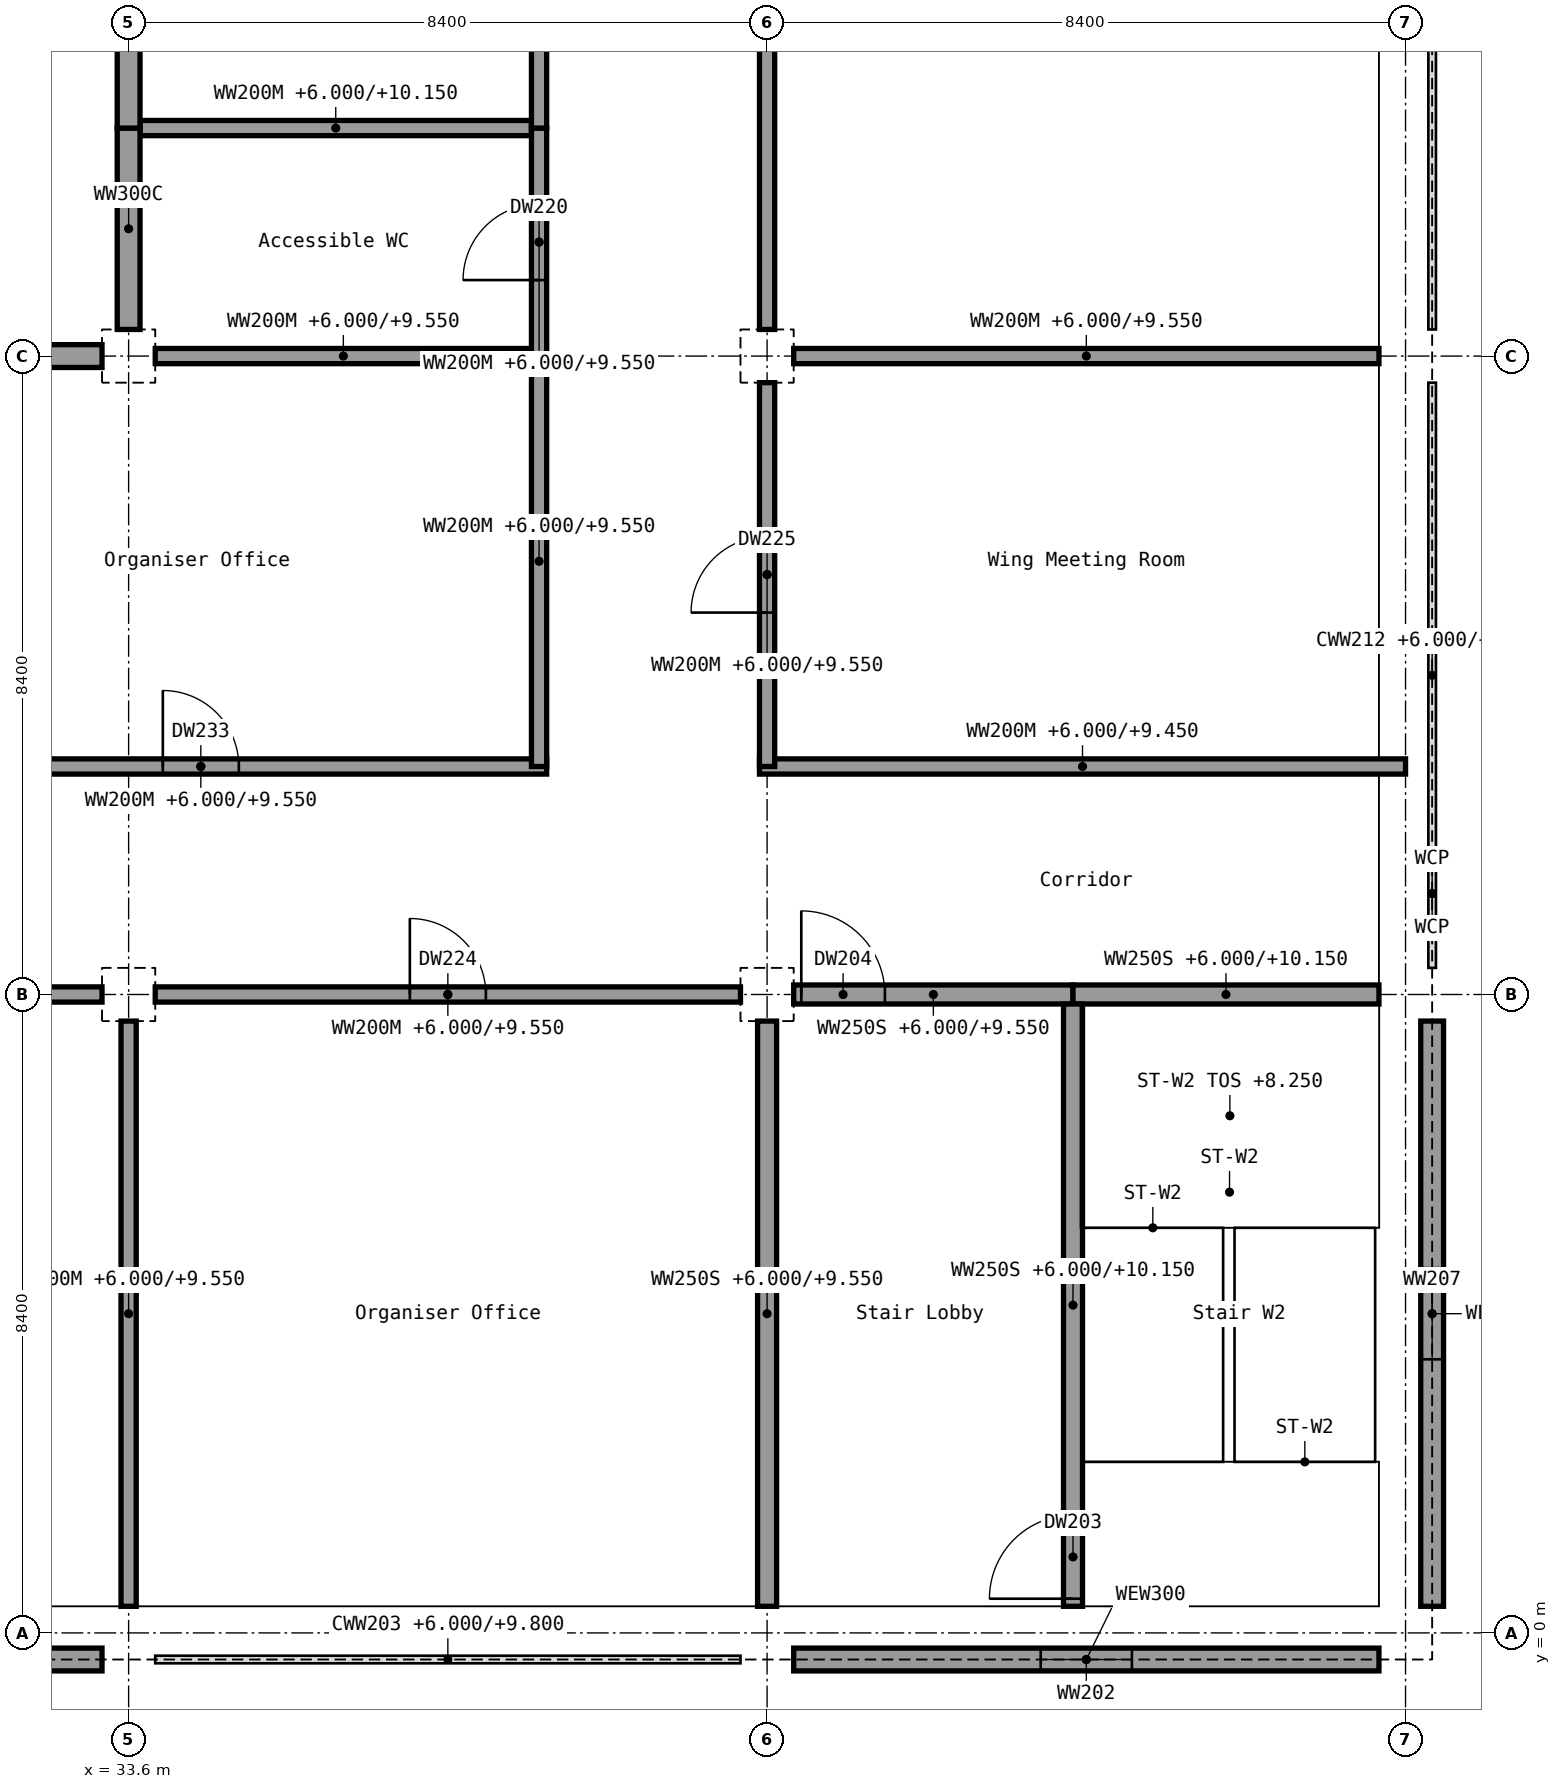
"""IFC4 building model, lengths in metres.
Left out: names, types, materials, properties, quantities, classifications, styles, units other than length and angle.
Written with IfcOpenShell. Run it as: python <this file> out.ifc"""

import sys

from ifc_helpers import new_model, si_unit, direction, frame, frame_2d, origin, origin_2d, place, context, subcontext, project, spatial, rectangle, extrude, element, fill, save


model = new_model("IFC4")
c1 = context("Model", 3, precision=1e-05, world=origin(), true_north=direction((0.0, 1.0)))
c2 = subcontext(c1, "Body", "Model", "MODEL_VIEW")
j1 = project(units=[si_unit("LENGTHUNIT", "METRE"), si_unit("PLANEANGLEUNIT", "RADIAN")], contexts=[c1])
p1 = place(None, origin())
s1 = spatial("IfcSite", under=j1, at=p1, CompositionType="ELEMENT")
p2 = place(p1, origin())
s2 = spatial("IfcBuilding", under=s1, at=p2, CompositionType="ELEMENT")
p3 = place(p2, frame((0.0, 0.0, 6.0)))
s3 = spatial("IfcBuildingStorey", under=s2, at=p3, CompositionType="ELEMENT", Elevation=6.0)
for number, where, z_axis, x_axis in (
    (1, (33.6, 0.0, 0.0), (0.0, 0.0, 1.0), (1.0, 0.0, 0.0)),
    (2, (33.6, 8.4, 0.0), (0.0, 0.0, 1.0), (1.0, 0.0, 0.0)),
    (3, (33.6, 16.8, 0.0), (0.0, 0.0, 1.0), (1.0, 0.0, 0.0)),
    (4, (42.0, 0.0, 0.0), (0.0, 0.0, 1.0), (1.0, 0.0, 0.0)),
    (5, (42.0, 8.4, 0.0), (0.0, 0.0, 1.0), (1.0, 0.0, 0.0)),
    (6, (42.0, 16.8, 0.0), (0.0, 0.0, 1.0), (1.0, 0.0, 0.0)),
    (7, (50.4, 0.0, 0.0), (0.0, 0.0, 1.0), (1.0, 0.0, 0.0)),
    (8, (50.4, 8.4, 0.0), (0.0, 0.0, 1.0), (1.0, 0.0, 0.0)),
    (9, (50.4, 16.8, 0.0), (0.0, 0.0, 1.0), (1.0, 0.0, 0.0)),
):
    element("IfcColumn", number, at=place(p3, frame(where, z_axis=z_axis, x_axis=x_axis)), inside=s3, PredefinedType="COLUMN", context=c2, shape_type="SweptSolid", body=[
        extrude(rectangle(XDim=0.7, YDim=0.7, at=origin_2d()), origin(), (0.0, 0.0, 1.0), 4.5),
    ])
p4 = place(p3, frame((25.55, -0.35, 0.0), z_axis=(0.0, 0.0, 1.0), x_axis=(1.0, 0.0, 0.0)))
e10 = element("IfcWall", 10, at=p4, inside=s3, PredefinedType="SOLIDWALL", context=c2, shape_type="SweptSolid", body=[
    extrude(rectangle(XDim=7.7, YDim=0.3, at=frame_2d((3.85, 0.0))), origin(), (0.0, 0.0, 1.0), 3.8),
])
p5 = place(p4, frame((3.25, 0.0, 0.0)))
e11 = element("IfcOpeningElement", 11, at=p5, cuts=e10, PredefinedType="OPENING", context=c2, shape_type="SweptSolid", body=[
    extrude(rectangle(XDim=1.2, YDim=2.1, at=frame_2d((0.6, 1.05))), frame((0.0, 0.15, 0.0), z_axis=(0.0, -1.0, 0.0), x_axis=(1.0, 0.0, 0.0)), (0.0, 0.0, 1.0), 0.3),
])
p6 = place(p3, frame((42.35, -0.35, 0.0), z_axis=(0.0, 0.0, 1.0), x_axis=(1.0, 0.0, 0.0)))
e12 = element("IfcWall", 12, at=p6, inside=s3, PredefinedType="SOLIDWALL", context=c2, shape_type="SweptSolid", body=[
    extrude(rectangle(XDim=7.7, YDim=0.3, at=frame_2d((3.85, 0.0))), origin(), (0.0, 0.0, 1.0), 3.8),
])
p7 = place(p6, frame((3.25, 0.0, 1.0)))
e13 = element("IfcOpeningElement", 13, at=p7, cuts=e12, PredefinedType="OPENING", context=c2, shape_type="SweptSolid", body=[
    extrude(rectangle(XDim=1.2, YDim=1.5, at=frame_2d((0.6, 0.75))), frame((0.0, 0.15, 0.0), z_axis=(0.0, -1.0, 0.0), x_axis=(1.0, 0.0, 0.0)), (0.0, 0.0, 1.0), 0.3),
])
p8 = place(p3, frame((50.75, 0.35, 0.0), z_axis=(0.0, 0.0, 1.0), x_axis=(0.0, 1.0, 0.0)))
e14 = element("IfcWall", 14, at=p8, inside=s3, PredefinedType="SOLIDWALL", context=c2, shape_type="SweptSolid", body=[
    extrude(rectangle(XDim=7.7, YDim=0.3, at=frame_2d((3.85, 0.0))), origin(), (0.0, 0.0, 1.0), 3.8),
])
p9 = place(p8, frame((3.25, 0.0, 1.0)))
e15 = element("IfcOpeningElement", 15, at=p9, cuts=e14, PredefinedType="OPENING", context=c2, shape_type="SweptSolid", body=[
    extrude(rectangle(XDim=1.2, YDim=1.5, at=frame_2d((0.6, 0.75))), frame((0.0, 0.15, 0.0), z_axis=(0.0, -1.0, 0.0), x_axis=(1.0, 0.0, 0.0)), (0.0, 0.0, 1.0), 0.3),
])
p10 = place(p3, frame((25.55, 8.4, 0.0), z_axis=(0.0, 0.0, 1.0), x_axis=(1.0, 0.0, 0.0)))
e16 = element("IfcWall", 16, at=p10, inside=s3, PredefinedType="PARTITIONING", context=c2, shape_type="SweptSolid", body=[
    extrude(rectangle(XDim=7.7, YDim=0.2, at=frame_2d((3.85, 0.0))), origin(), (0.0, 0.0, 1.0), 3.55),
])
p11 = place(p10, frame((3.35, 0.0, 0.0)))
e17 = element("IfcOpeningElement", 17, at=p11, cuts=e16, PredefinedType="OPENING", context=c2, shape_type="SweptSolid", body=[
    extrude(rectangle(XDim=1.0, YDim=2.1, at=frame_2d((0.5, 1.05))), frame((0.0, 0.1, 0.0), z_axis=(0.0, -1.0, 0.0), x_axis=(1.0, 0.0, 0.0)), (0.0, 0.0, 1.0), 0.2),
])
p12 = place(p3, frame((33.95, 8.4, 0.0), z_axis=(0.0, 0.0, 1.0), x_axis=(1.0, 0.0, 0.0)))
e18 = element("IfcWall", 18, at=p12, inside=s3, PredefinedType="PARTITIONING", context=c2, shape_type="SweptSolid", body=[
    extrude(rectangle(XDim=7.7, YDim=0.2, at=frame_2d((3.85, 0.0))), origin(), (0.0, 0.0, 1.0), 3.55),
])
p13 = place(p12, frame((3.35, 0.0, 0.0)))
e19 = element("IfcOpeningElement", 19, at=p13, cuts=e18, PredefinedType="OPENING", context=c2, shape_type="SweptSolid", body=[
    extrude(rectangle(XDim=1.0, YDim=2.1, at=frame_2d((0.5, 1.05))), frame((0.0, 0.1, 0.0), z_axis=(0.0, -1.0, 0.0), x_axis=(1.0, 0.0, 0.0)), (0.0, 0.0, 1.0), 0.2),
])
p14 = place(p3, frame((42.35, 8.4, 0.0), z_axis=(0.0, 0.0, 1.0), x_axis=(1.0, 0.0, 0.0)))
e20 = element("IfcWall", 20, at=p14, inside=s3, PredefinedType="SHEAR", context=c2, shape_type="SweptSolid", body=[
    extrude(rectangle(XDim=3.675, YDim=0.25, at=frame_2d((1.837, 0.0))), origin(), (0.0, 0.0, 1.0), 3.55),
])
p15 = place(p14, frame((0.1, 0.0, 0.0)))
e21 = element("IfcOpeningElement", 21, at=p15, cuts=e20, PredefinedType="OPENING", context=c2, shape_type="SweptSolid", body=[
    extrude(rectangle(XDim=1.1, YDim=2.1, at=frame_2d((0.55, 1.05))), frame((0.0, 0.125, 0.0), z_axis=(0.0, -1.0, 0.0), x_axis=(1.0, 0.0, 0.0)), (0.0, 0.0, 1.0), 0.25),
])
p16 = place(p3, frame((46.025, 8.4, 0.0), z_axis=(0.0, 0.0, 1.0), x_axis=(1.0, 0.0, 0.0)))
e22 = element("IfcWall", 22, at=p16, inside=s3, PredefinedType="SHEAR", context=c2, shape_type="SweptSolid", body=[
    extrude(rectangle(XDim=4.025, YDim=0.25, at=frame_2d((2.013, 0.0))), origin(), (0.0, 0.0, 1.0), 4.15),
])
p17 = place(p3, frame((30.0, 11.4, 0.0), z_axis=(0.0, 0.0, 1.0), x_axis=(1.0, 0.0, 0.0)))
e23 = element("IfcWall", 23, at=p17, inside=s3, PredefinedType="PARTITIONING", context=c2, shape_type="SweptSolid", body=[
    extrude(rectangle(XDim=9.1, YDim=0.2, at=frame_2d((4.55, 0.0))), origin(), (0.0, 0.0, 1.0), 3.55),
])
p18 = place(p17, frame((4.05, 0.0, 0.0)))
e24 = element("IfcOpeningElement", 24, at=p18, cuts=e23, PredefinedType="OPENING", context=c2, shape_type="SweptSolid", body=[
    extrude(rectangle(XDim=1.0, YDim=2.1, at=frame_2d((0.5, 1.05))), frame((0.0, 0.1, 0.0), z_axis=(0.0, -1.0, 0.0), x_axis=(1.0, 0.0, 0.0)), (0.0, 0.0, 1.0), 0.2),
])
p19 = place(p3, frame((41.9, 11.4, 0.0), z_axis=(0.0, 0.0, 1.0), x_axis=(1.0, 0.0, 0.0)))
e25 = element("IfcWall", 25, at=p19, inside=s3, PredefinedType="PARTITIONING", context=c2, shape_type="SweptSolid", body=[
    extrude(rectangle(XDim=8.5, YDim=0.2, at=frame_2d((4.25, 0.0))), origin(), (0.0, 0.0, 1.0), 3.45),
])
p20 = place(p3, frame((30.0, 16.8, 0.0), z_axis=(0.0, 0.0, 1.0), x_axis=(1.0, 0.0, 0.0)))
e26 = element("IfcWall", 26, at=p20, inside=s3, PredefinedType="SHEAR", context=c2, shape_type="SweptSolid", body=[
    extrude(rectangle(XDim=3.25, YDim=0.3, at=frame_2d((1.625, 0.0))), origin(), (0.0, 0.0, 1.0), 4.15),
])
p21 = place(p3, frame((33.95, 16.8, 0.0), z_axis=(0.0, 0.0, 1.0), x_axis=(1.0, 0.0, 0.0)))
e27 = element("IfcWall", 27, at=p21, inside=s3, PredefinedType="PARTITIONING", context=c2, shape_type="SweptSolid", body=[
    extrude(rectangle(XDim=4.95, YDim=0.2, at=frame_2d((2.475, 0.0))), origin(), (0.0, 0.0, 1.0), 3.55),
])
p22 = place(p3, frame((42.35, 16.8, 0.0), z_axis=(0.0, 0.0, 1.0), x_axis=(1.0, 0.0, 0.0)))
e28 = element("IfcWall", 28, at=p22, inside=s3, PredefinedType="PARTITIONING", context=c2, shape_type="SweptSolid", body=[
    extrude(rectangle(XDim=7.7, YDim=0.2, at=frame_2d((3.85, 0.0))), origin(), (0.0, 0.0, 1.0), 3.55),
])
p23 = place(p3, frame((33.75, 19.8, 0.0), z_axis=(0.0, 0.0, 1.0), x_axis=(1.0, 0.0, 0.0)))
e29 = element("IfcWall", 29, at=p23, inside=s3, PredefinedType="PARTITIONING", context=c2, shape_type="SweptSolid", body=[
    extrude(rectangle(XDim=5.15, YDim=0.2, at=frame_2d((2.575, 0.0))), origin(), (0.0, 0.0, 1.0), 4.15),
])
p24 = place(p3, frame((33.6, 0.35, 0.0), z_axis=(0.0, 0.0, 1.0), x_axis=(0.0, 1.0, 0.0)))
e30 = element("IfcWall", 30, at=p24, inside=s3, PredefinedType="PARTITIONING", context=c2, shape_type="SweptSolid", body=[
    extrude(rectangle(XDim=7.7, YDim=0.2, at=frame_2d((3.85, 0.0))), origin(), (0.0, 0.0, 1.0), 3.55),
])
p25 = place(p3, frame((33.6, 17.15, 0.0), z_axis=(0.0, 0.0, 1.0), x_axis=(0.0, 1.0, 0.0)))
e31 = element("IfcWall", 31, at=p25, inside=s3, PredefinedType="SHEAR", context=c2, shape_type="SweptSolid", body=[
    extrude(rectangle(XDim=2.65, YDim=0.3, at=frame_2d((1.325, 0.0))), origin(), (0.0, 0.0, 1.0), 4.15),
])
p26 = place(p3, frame((33.6, 19.8, 0.0), z_axis=(0.0, 0.0, 1.0), x_axis=(0.0, 1.0, 0.0)))
e32 = element("IfcWall", 32, at=p26, inside=s3, PredefinedType="SHEAR", context=c2, shape_type="SweptSolid", body=[
    extrude(rectangle(XDim=4.8, YDim=0.3, at=frame_2d((2.4, 0.0))), origin(), (0.0, 0.0, 1.0), 4.15),
])
p27 = place(p3, frame((39.0, 11.4, 0.0), z_axis=(0.0, 0.0, 1.0), x_axis=(0.0, 1.0, 0.0)))
e33 = element("IfcWall", 33, at=p27, inside=s3, PredefinedType="PARTITIONING", context=c2, shape_type="SweptSolid", body=[
    extrude(rectangle(XDim=5.4, YDim=0.2, at=frame_2d((2.7, 0.0))), origin(), (0.0, 0.0, 1.0), 3.55),
])
p28 = place(p3, frame((39.0, 16.8, 0.0), z_axis=(0.0, 0.0, 1.0), x_axis=(0.0, 1.0, 0.0)))
e34 = element("IfcWall", 34, at=p28, inside=s3, PredefinedType="PARTITIONING", context=c2, shape_type="SweptSolid", body=[
    extrude(rectangle(XDim=3.0, YDim=0.2, at=frame_2d((1.5, 0.0))), origin(), (0.0, 0.0, 1.0), 3.55),
])
p29 = place(p28, frame((1.0, 0.0, 0.0)))
e35 = element("IfcOpeningElement", 35, at=p29, cuts=e34, PredefinedType="OPENING", context=c2, shape_type="SweptSolid", body=[
    extrude(rectangle(XDim=1.0, YDim=2.1, at=frame_2d((0.5, 1.05))), frame((0.0, 0.1, 0.0), z_axis=(0.0, -1.0, 0.0), x_axis=(1.0, 0.0, 0.0)), (0.0, 0.0, 1.0), 0.2),
])
p30 = place(p3, frame((39.0, 19.8, 0.0), z_axis=(0.0, 0.0, 1.0), x_axis=(0.0, 1.0, 0.0)))
e36 = element("IfcWall", 36, at=p30, inside=s3, PredefinedType="PARTITIONING", context=c2, shape_type="SweptSolid", body=[
    extrude(rectangle(XDim=13.8, YDim=0.2, at=frame_2d((6.9, 0.0))), origin(), (0.0, 0.0, 1.0), 3.55),
])
p31 = place(p30, frame((6.4, 0.0, 0.0)))
e37 = element("IfcOpeningElement", 37, at=p31, cuts=e36, PredefinedType="OPENING", context=c2, shape_type="SweptSolid", body=[
    extrude(rectangle(XDim=1.0, YDim=2.1, at=frame_2d((0.5, 1.05))), frame((0.0, 0.1, 0.0), z_axis=(0.0, -1.0, 0.0), x_axis=(1.0, 0.0, 0.0)), (0.0, 0.0, 1.0), 0.2),
])
p32 = place(p3, frame((42.0, 0.35, 0.0), z_axis=(0.0, 0.0, 1.0), x_axis=(0.0, 1.0, 0.0)))
e38 = element("IfcWall", 38, at=p32, inside=s3, PredefinedType="SHEAR", context=c2, shape_type="SweptSolid", body=[
    extrude(rectangle(XDim=7.7, YDim=0.25, at=frame_2d((3.85, 0.0))), origin(), (0.0, 0.0, 1.0), 3.55),
])
p33 = place(p3, frame((42.0, 11.4, 0.0), z_axis=(0.0, 0.0, 1.0), x_axis=(0.0, 1.0, 0.0)))
e39 = element("IfcWall", 39, at=p33, inside=s3, PredefinedType="PARTITIONING", context=c2, shape_type="SweptSolid", body=[
    extrude(rectangle(XDim=5.05, YDim=0.2, at=frame_2d((2.525, 0.0))), origin(), (0.0, 0.0, 1.0), 3.55),
])
p34 = place(p33, frame((2.025, 0.0, 0.0)))
e40 = element("IfcOpeningElement", 40, at=p34, cuts=e39, PredefinedType="OPENING", context=c2, shape_type="SweptSolid", body=[
    extrude(rectangle(XDim=1.0, YDim=2.1, at=frame_2d((0.5, 1.05))), frame((0.0, 0.1, 0.0), z_axis=(0.0, -1.0, 0.0), x_axis=(1.0, 0.0, 0.0)), (0.0, 0.0, 1.0), 0.2),
])
p35 = place(p3, frame((42.0, 17.15, 0.0), z_axis=(0.0, 0.0, 1.0), x_axis=(0.0, 1.0, 0.0)))
e41 = element("IfcWall", 41, at=p35, inside=s3, PredefinedType="PARTITIONING", context=c2, shape_type="SweptSolid", body=[
    extrude(rectangle(XDim=7.7, YDim=0.2, at=frame_2d((3.85, 0.0))), origin(), (0.0, 0.0, 1.0), 3.55),
])
p36 = place(p3, frame((46.025, 0.35, 0.0), z_axis=(0.0, 0.0, 1.0), x_axis=(0.0, 1.0, 0.0)))
e42 = element("IfcWall", 42, at=p36, inside=s3, PredefinedType="SHEAR", context=c2, shape_type="SweptSolid", body=[
    extrude(rectangle(XDim=7.925, YDim=0.25, at=frame_2d((3.962, 0.0))), origin(), (0.0, 0.0, 1.0), 4.15),
])
p37 = place(p36, frame((0.1, 0.0, 0.0)))
e43 = element("IfcOpeningElement", 43, at=p37, cuts=e42, PredefinedType="OPENING", context=c2, shape_type="SweptSolid", body=[
    extrude(rectangle(XDim=1.1, YDim=2.1, at=frame_2d((0.55, 1.05))), frame((0.0, 0.125, 0.0), z_axis=(0.0, -1.0, 0.0), x_axis=(1.0, 0.0, 0.0)), (0.0, 0.0, 1.0), 0.25),
])
p38 = place(p7, origin())
e44 = element("IfcWindow", 44, at=p38, inside=s3, PartitioningType="SINGLE_PANEL", PredefinedType="WINDOW", context=c2, shape_type="SweptSolid", body=[
    extrude(rectangle(XDim=1.2, YDim=1.5, at=frame_2d((0.6, 0.75))), frame((0.0, 0.03, 0.0), z_axis=(0.0, -1.0, 0.0), x_axis=(1.0, 0.0, 0.0)), (0.0, 0.0, 1.0), 0.06),
])
fill(e13, e44)
p39 = place(p9, origin())
e45 = element("IfcWindow", 45, at=p39, inside=s3, PartitioningType="SINGLE_PANEL", PredefinedType="WINDOW", context=c2, shape_type="SweptSolid", body=[
    extrude(rectangle(XDim=1.2, YDim=1.5, at=frame_2d((0.6, 0.75))), frame((0.0, 0.03, 0.0), z_axis=(0.0, -1.0, 0.0), x_axis=(1.0, 0.0, 0.0)), (0.0, 0.0, 1.0), 0.06),
])
fill(e15, e45)
p40 = place(p37, origin())
e46 = element("IfcDoor", 46, at=p40, inside=s3, OperationType="SINGLE_SWING_LEFT", PredefinedType="DOOR", context=c2, shape_type="SweptSolid", body=[
    extrude(rectangle(XDim=1.1, YDim=2.1, at=frame_2d((0.55, 1.05))), frame((0.0, 0.025, 0.0), z_axis=(0.0, -1.0, 0.0), x_axis=(1.0, 0.0, 0.0)), (0.0, 0.0, 1.0), 0.05),
])
fill(e43, e46)
p41 = place(p15, origin())
e47 = element("IfcDoor", 47, at=p41, inside=s3, OperationType="SINGLE_SWING_LEFT", PredefinedType="DOOR", context=c2, shape_type="SweptSolid", body=[
    extrude(rectangle(XDim=1.1, YDim=2.1, at=frame_2d((0.55, 1.05))), frame((0.0, 0.025, 0.0), z_axis=(0.0, -1.0, 0.0), x_axis=(1.0, 0.0, 0.0)), (0.0, 0.0, 1.0), 0.05),
])
fill(e21, e47)
p42 = place(p29, origin())
e48 = element("IfcDoor", 48, at=p42, inside=s3, OperationType="SINGLE_SWING_LEFT", PredefinedType="DOOR", context=c2, shape_type="SweptSolid", body=[
    extrude(rectangle(XDim=1.0, YDim=2.1, at=frame_2d((0.5, 1.05))), frame((0.0, 0.025, 0.0), z_axis=(0.0, -1.0, 0.0), x_axis=(1.0, 0.0, 0.0)), (0.0, 0.0, 1.0), 0.05),
])
fill(e35, e48)
p43 = place(p13, origin())
e49 = element("IfcDoor", 49, at=p43, inside=s3, OperationType="SINGLE_SWING_LEFT", PredefinedType="DOOR", context=c2, shape_type="SweptSolid", body=[
    extrude(rectangle(XDim=1.0, YDim=2.1, at=frame_2d((0.5, 1.05))), frame((0.0, 0.025, 0.0), z_axis=(0.0, -1.0, 0.0), x_axis=(1.0, 0.0, 0.0)), (0.0, 0.0, 1.0), 0.05),
])
fill(e19, e49)
p44 = place(p34, origin())
e50 = element("IfcDoor", 50, at=p44, inside=s3, OperationType="SINGLE_SWING_LEFT", PredefinedType="DOOR", context=c2, shape_type="SweptSolid", body=[
    extrude(rectangle(XDim=1.0, YDim=2.1, at=frame_2d((0.5, 1.05))), frame((0.0, 0.025, 0.0), z_axis=(0.0, -1.0, 0.0), x_axis=(1.0, 0.0, 0.0)), (0.0, 0.0, 1.0), 0.05),
])
fill(e40, e50)
p45 = place(p18, origin())
e51 = element("IfcDoor", 51, at=p45, inside=s3, OperationType="SINGLE_SWING_LEFT", PredefinedType="DOOR", context=c2, shape_type="SweptSolid", body=[
    extrude(rectangle(XDim=1.0, YDim=2.1, at=frame_2d((0.5, 1.05))), frame((0.0, 0.025, 0.0), z_axis=(0.0, -1.0, 0.0), x_axis=(1.0, 0.0, 0.0)), (0.0, 0.0, 1.0), 0.05),
])
fill(e24, e51)
save(model, sys.argv[1])
